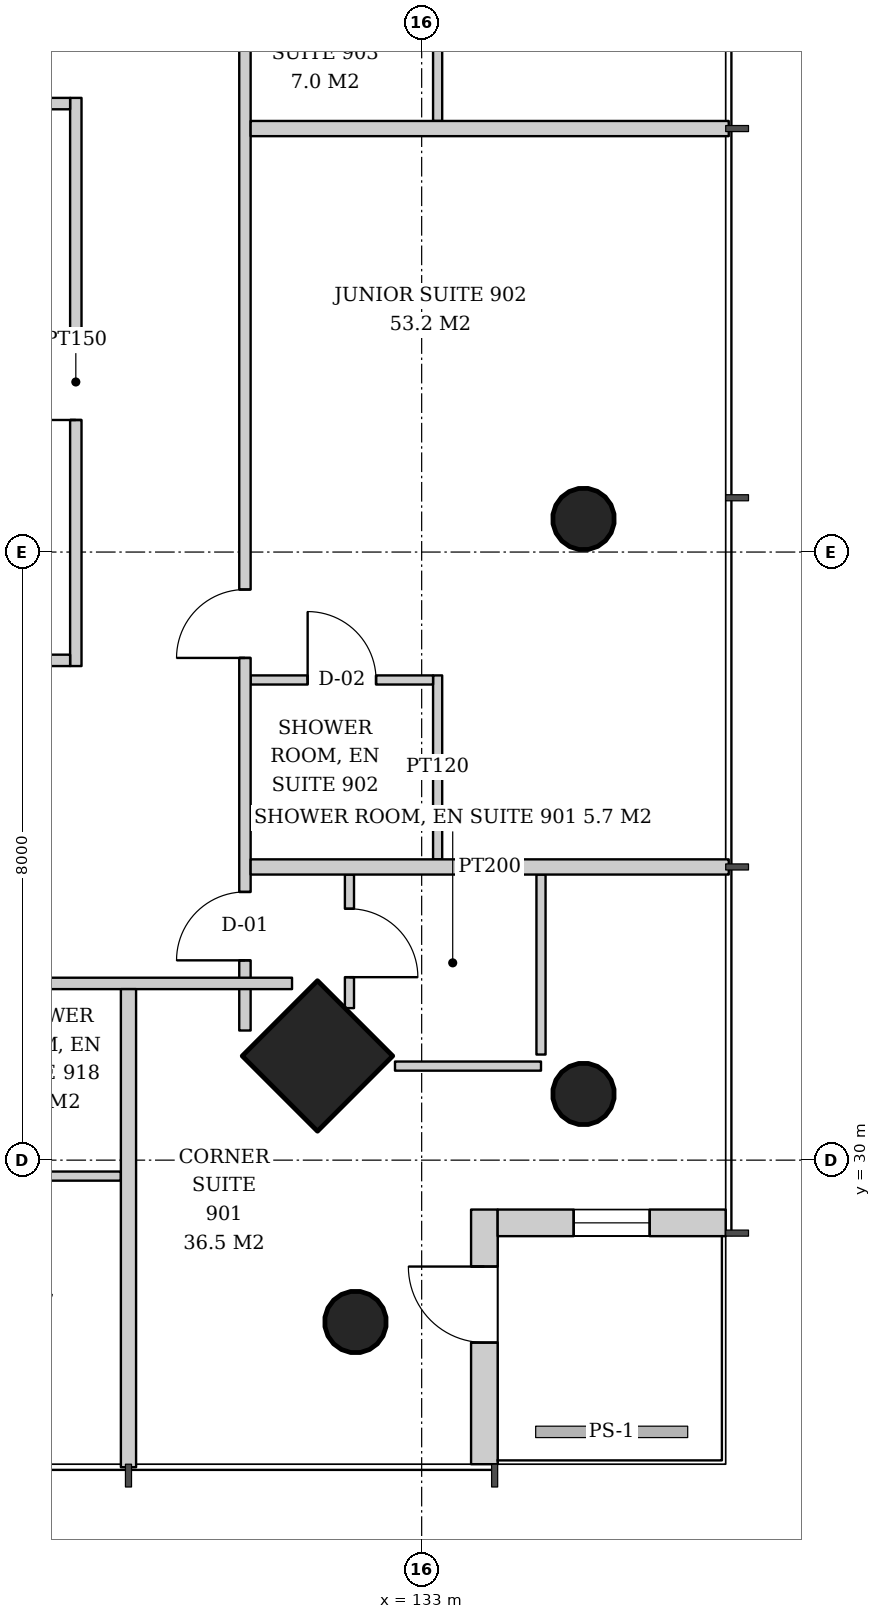
"""IFC4 building model, lengths in metres.
Left out: names, types, materials, properties, quantities, classifications, styles, units other than length and angle.
Written with IfcOpenShell. Run it as: python <this file> out.ifc"""

import sys

from ifc_helpers import new_model, si_unit, direction, frame, frame_2d, origin, origin_2d, place, context, subcontext, project, spatial, rectangle, hollow_circle, extrude, element, fill, save


model = new_model("IFC4")
c1 = context("Model", 3, precision=1e-05, world=origin(), true_north=direction((0.0, 1.0)))
c2 = subcontext(c1, "Body", "Model", "MODEL_VIEW")
j1 = project(units=[si_unit("LENGTHUNIT", "METRE"), si_unit("PLANEANGLEUNIT", "RADIAN")], contexts=[c1])
p1 = place(None, origin())
s1 = spatial("IfcSite", under=j1, at=p1, CompositionType="ELEMENT")
p2 = place(p1, origin())
s2 = spatial("IfcBuilding", under=s1, at=p2, CompositionType="ELEMENT")
p3 = place(p2, frame((0.0, 0.0, 40.0)))
s3 = spatial("IfcBuildingStorey", under=s2, at=p3, CompositionType="ELEMENT", Elevation=40.0)
p4 = place(p3, frame((135.181, 30.819, 0.0), z_axis=(-0.043029647111, 0.043029647111, 0.998146732169), x_axis=(-0.707106781187, -0.707106781187, 0.0)))
e1 = element("IfcColumn", 1, at=p4, inside=s3, PredefinedType="COLUMN", context=c2, shape_type="SweptSolid", body=[
    extrude(hollow_circle(Radius=0.406, WallThickness=0.03, at=origin_2d()), origin(), (0.0, 0.0, 1.0), 3.807),
])
p5 = place(p3, frame((135.181, 38.409, 0.0), z_axis=(-0.043059525333, 0.021561848751, 0.998839808957), x_axis=(-0.44774654769, -0.894160516368, 0.0)))
e2 = element("IfcColumn", 2, at=p5, inside=s3, PredefinedType="COLUMN", context=c2, shape_type="SweptSolid", body=[
    extrude(hollow_circle(Radius=0.406, WallThickness=0.03, at=origin_2d()), origin(), (0.0, 0.0, 1.0), 3.804),
])
p6 = place(p3, frame((131.681, 31.319, 0.0), z_axis=(-0.043029647111, 0.043029647111, 0.998146732169), x_axis=(-0.707106781187, -0.707106781187, 0.0)))
e3 = element("IfcColumn", 3, at=p6, inside=s3, PredefinedType="COLUMN", context=c2, shape_type="SweptSolid", body=[
    extrude(rectangle(XDim=1.4, YDim=1.4, at=origin_2d()), origin(), (0.0, 0.0, 1.0), 3.807),
])
p7 = place(p3, frame((132.181, 27.819, 0.0), z_axis=(-0.043029647111, 0.043029647111, 0.998146732169), x_axis=(-0.707106781187, -0.707106781187, 0.0)))
e4 = element("IfcColumn", 4, at=p7, inside=s3, PredefinedType="COLUMN", context=c2, shape_type="SweptSolid", body=[
    extrude(hollow_circle(Radius=0.406, WallThickness=0.03, at=origin_2d()), origin(), (0.0, 0.0, 1.0), 3.807),
])
p8 = place(p3, frame((133.825, 26.0, 0.0), z_axis=(0.0, 0.0, 1.0), x_axis=(0.0, 1.0, 0.0)))
e5 = element("IfcWall", 5, at=p8, inside=s3, PredefinedType="SOLIDWALL", context=c2, shape_type="SweptSolid", body=[
    extrude(rectangle(XDim=3.35, YDim=0.35, at=frame_2d((1.675, 0.0))), origin(), (0.0, 0.0, 1.0), 3.6),
])
p9 = place(p8, frame((1.6, 0.0, 0.0)))
e6 = element("IfcOpeningElement", 6, at=p9, cuts=e5, PredefinedType="OPENING", context=c2, shape_type="SweptSolid", body=[
    extrude(rectangle(XDim=1.0, YDim=2.4, at=frame_2d((0.5, 1.2))), frame((0.0, 0.185, 0.0), z_axis=(0.0, -1.0, 0.0), x_axis=(1.0, 0.0, 0.0)), (0.0, 0.0, 1.0), 0.37),
])
p10 = place(p3, frame((134.0, 29.175, 0.0), z_axis=(0.0, 0.0, 1.0), x_axis=(1.0, 0.0, 0.0)))
e7 = element("IfcWall", 7, at=p10, inside=s3, PredefinedType="SOLIDWALL", context=c2, shape_type="SweptSolid", body=[
    extrude(rectangle(XDim=3.0, YDim=0.35, at=frame_2d((1.5, 0.0))), origin(), (0.0, 0.0, 1.0), 3.6),
])
p11 = place(p10, frame((1.0, 0.0, 0.9)))
e8 = element("IfcOpeningElement", 8, at=p11, cuts=e7, PredefinedType="OPENING", context=c2, shape_type="SweptSolid", body=[
    extrude(rectangle(XDim=1.0, YDim=2.4, at=frame_2d((0.5, 1.2))), frame((0.0, 0.185, 0.0), z_axis=(0.0, -1.0, 0.0), x_axis=(1.0, 0.0, 0.0)), (0.0, 0.0, 1.0), 0.37),
])
p12 = place(p3, frame((128.45, 36.5, 0.0), z_axis=(0.0, 0.0, 1.0), x_axis=(0.0, 1.0, 0.0)))
e9 = element("IfcWall", 9, at=p12, inside=s3, PredefinedType="PARTITIONING", context=c2, shape_type="SweptSolid", body=[
    extrude(rectangle(XDim=7.475, YDim=0.15, at=frame_2d((3.738, 0.0))), origin(), (0.0, 0.0, 1.0), 2.8),
])
p13 = place(p12, frame((3.238, 0.0, 0.0)))
e10 = element("IfcOpeningElement", 10, at=p13, cuts=e9, PredefinedType="OPENING", context=c2, shape_type="SweptSolid", body=[
    extrude(rectangle(XDim=1.0, YDim=2.1, at=frame_2d((0.5, 1.05))), frame((0.0, 0.085, 0.0), z_axis=(0.0, -1.0, 0.0), x_axis=(1.0, 0.0, 0.0)), (0.0, 0.0, 1.0), 0.17),
])
p14 = place(p3, frame((126.5, 36.575, 0.0), z_axis=(0.0, 0.0, 1.0), x_axis=(1.0, 0.0, 0.0)))
e11 = element("IfcWall", 11, at=p14, inside=s3, PredefinedType="PARTITIONING", context=c2, shape_type="SweptSolid", body=[
    extrude(rectangle(XDim=1.875, YDim=0.15, at=frame_2d((0.938, 0.0))), origin(), (0.0, 0.0, 1.0), 2.8),
])
p15 = place(p3, frame((126.5, 43.9, 0.0), z_axis=(0.0, 0.0, 1.0), x_axis=(1.0, 0.0, 0.0)))
e12 = element("IfcWall", 12, at=p15, inside=s3, PredefinedType="PARTITIONING", context=c2, shape_type="SweptSolid", body=[
    extrude(rectangle(XDim=1.875, YDim=0.15, at=frame_2d((0.938, 0.0))), origin(), (0.0, 0.0, 1.0), 3.6),
])
p16 = place(p3, frame((132.05, 33.757, 0.0), z_axis=(0.0, 0.0, 1.0), x_axis=(0.0, -1.0, 0.0)))
e13 = element("IfcWall", 13, at=p16, inside=s3, PredefinedType="PARTITIONING", context=c2, shape_type="SweptSolid", body=[
    extrude(rectangle(XDim=1.757, YDim=0.12, at=frame_2d((0.878, 0.0))), origin(), (0.0, 0.0, 1.0), 3.6),
])
p17 = place(p16, frame((0.45, 0.0, 0.0)))
e14 = element("IfcOpeningElement", 14, at=p17, cuts=e13, PredefinedType="OPENING", context=c2, shape_type="SweptSolid", body=[
    extrude(rectangle(XDim=0.9, YDim=2.1, at=frame_2d((0.45, 1.05))), frame((0.0, 0.07, 0.0), z_axis=(0.0, -1.0, 0.0), x_axis=(1.0, 0.0, 0.0)), (0.0, 0.0, 1.0), 0.14),
])
p18 = place(p3, frame((134.57, 33.757, 0.0), z_axis=(0.0, 0.0, 1.0), x_axis=(0.0, -1.0, 0.0)))
e15 = element("IfcWall", 15, at=p18, inside=s3, PredefinedType="PARTITIONING", context=c2, shape_type="SweptSolid", body=[
    extrude(rectangle(XDim=2.368, YDim=0.12, at=frame_2d((1.184, 0.0))), origin(), (0.0, 0.0, 1.0), 3.6),
])
p19 = place(p3, frame((132.649, 31.237, 0.0), z_axis=(0.0, 0.0, 1.0), x_axis=(1.0, 0.0, 0.0)))
e16 = element("IfcWall", 16, at=p19, inside=s3, PredefinedType="PARTITIONING", context=c2, shape_type="SweptSolid", body=[
    extrude(rectangle(XDim=1.921, YDim=0.12, at=frame_2d((0.96, 0.0))), origin(), (0.0, 0.0, 1.0), 3.2),
])
p20 = place(p3, frame((133.21, 33.957, 0.0), z_axis=(0.0, 0.0, 1.0), x_axis=(0.0, 1.0, 0.0)))
e17 = element("IfcWall", 17, at=p20, inside=s3, PredefinedType="PARTITIONING", context=c2, shape_type="SweptSolid", body=[
    extrude(rectangle(XDim=2.42, YDim=0.12, at=frame_2d((1.21, 0.0))), origin(), (0.0, 0.0, 1.0), 3.6),
])
p21 = place(p3, frame((130.75, 36.317, 0.0), z_axis=(0.0, 0.0, 1.0), x_axis=(1.0, 0.0, 0.0)))
e18 = element("IfcWall", 18, at=p21, inside=s3, PredefinedType="PARTITIONING", context=c2, shape_type="SweptSolid", body=[
    extrude(rectangle(XDim=2.4, YDim=0.12, at=frame_2d((1.2, 0.0))), origin(), (0.0, 0.0, 1.0), 3.6),
])
p22 = place(p21, frame((0.75, 0.0, 0.0)))
e19 = element("IfcOpeningElement", 19, at=p22, cuts=e18, PredefinedType="OPENING", context=c2, shape_type="SweptSolid", body=[
    extrude(rectangle(XDim=0.9, YDim=2.1, at=frame_2d((0.45, 1.05))), frame((0.0, 0.07, 0.0), z_axis=(0.0, -1.0, 0.0), x_axis=(1.0, 0.0, 0.0)), (0.0, 0.0, 1.0), 0.14),
])
p23 = place(p3, frame((133.21, 43.671, 0.0), z_axis=(0.0, 0.0, 1.0), x_axis=(0.0, 1.0, 0.0)))
e20 = element("IfcWall", 20, at=p23, inside=s3, PredefinedType="PARTITIONING", context=c2, shape_type="SweptSolid", body=[
    extrude(rectangle(XDim=2.72, YDim=0.12, at=frame_2d((1.36, 0.0))), origin(), (0.0, 0.0, 1.0), 2.847),
])
p24 = place(p3, frame((130.675, 31.706, 0.0), z_axis=(0.0, 0.0, 1.0), x_axis=(0.0, 1.0, 0.0)))
e21 = element("IfcWall", 21, at=p24, inside=s3, PredefinedType="PARTITIONING", context=c2, shape_type="SweptSolid", body=[
    extrude(rectangle(XDim=28.589, YDim=0.15, at=frame_2d((14.294, 0.0))), origin(), (0.0, 0.0, 1.0), 2.8),
])
p25 = place(p24, frame((0.923, 0.0, 0.0)))
e22 = element("IfcOpeningElement", 22, at=p25, cuts=e21, PredefinedType="OPENING", context=c2, shape_type="SweptSolid", body=[
    extrude(rectangle(XDim=0.9, YDim=2.1, at=frame_2d((0.45, 1.05))), frame((0.0, 0.085, 0.0), z_axis=(0.0, -1.0, 0.0), x_axis=(1.0, 0.0, 0.0)), (0.0, 0.0, 1.0), 0.17),
])
p26 = place(p24, frame((4.902, 0.0, 0.0)))
e23 = element("IfcOpeningElement", 23, at=p26, cuts=e21, PredefinedType="OPENING", context=c2, shape_type="SweptSolid", body=[
    extrude(rectangle(XDim=0.9, YDim=2.1, at=frame_2d((0.45, 1.05))), frame((0.0, 0.085, 0.0), z_axis=(0.0, -1.0, 0.0), x_axis=(1.0, 0.0, 0.0)), (0.0, 0.0, 1.0), 0.17),
])
p27 = place(p24, frame((14.866, 0.0, 0.0)))
e24 = element("IfcOpeningElement", 24, at=p27, cuts=e21, PredefinedType="OPENING", context=c2, shape_type="SweptSolid", body=[
    extrude(rectangle(XDim=0.9, YDim=2.1, at=frame_2d((0.45, 1.05))), frame((0.0, 0.085, 0.0), z_axis=(0.0, -1.0, 0.0), x_axis=(1.0, 0.0, 0.0)), (0.0, 0.0, 1.0), 0.17),
])
p28 = place(p24, frame((17.93, 0.0, 0.0)))
e25 = element("IfcOpeningElement", 25, at=p28, cuts=e21, PredefinedType="OPENING", context=c2, shape_type="SweptSolid", body=[
    extrude(rectangle(XDim=0.9, YDim=2.1, at=frame_2d((0.45, 1.05))), frame((0.0, 0.085, 0.0), z_axis=(0.0, -1.0, 0.0), x_axis=(1.0, 0.0, 0.0)), (0.0, 0.0, 1.0), 0.17),
])
p29 = place(p24, frame((24.33, 0.0, 0.0)))
e26 = element("IfcOpeningElement", 26, at=p29, cuts=e21, PredefinedType="OPENING", context=c2, shape_type="SweptSolid", body=[
    extrude(rectangle(XDim=0.9, YDim=2.1, at=frame_2d((0.45, 1.05))), frame((0.0, 0.085, 0.0), z_axis=(0.0, -1.0, 0.0), x_axis=(1.0, 0.0, 0.0)), (0.0, 0.0, 1.0), 0.17),
])
for number, where, z_axis, x_axis in (
    (27, (130.75, 33.857, 0.0), (0.0, 0.0, 1.0), (1.0, 0.0, 0.0)),
    (28, (130.75, 43.572, 0.0), (0.0, 0.0, 1.0), (1.0, 0.0, 0.0)),
):
    element("IfcWall", number, at=place(p3, frame(where, z_axis=z_axis, x_axis=x_axis)), inside=s3, PredefinedType="PARTITIONING", context=c2, shape_type="SweptSolid", body=[
        extrude(rectangle(XDim=6.29, YDim=0.2, at=frame_2d((3.145, 0.0))), origin(), (0.0, 0.0, 1.0), 3.05),
    ])
p30 = place(p3, frame((126.623, 29.79, 0.0), z_axis=(0.0, 0.0, 1.0), x_axis=(1.0, 0.0, 0.0)))
e29 = element("IfcWall", 29, at=p30, inside=s3, PredefinedType="PARTITIONING", context=c2, shape_type="SweptSolid", body=[
    extrude(rectangle(XDim=2.42, YDim=0.12, at=frame_2d((1.21, 0.0))), origin(), (0.0, 0.0, 1.0), 3.6),
])
p31 = place(p3, frame((102.706, 32.325, 0.0), z_axis=(0.0, 0.0, 1.0), x_axis=(1.0, 0.0, 0.0)))
e30 = element("IfcWall", 30, at=p31, inside=s3, PredefinedType="PARTITIONING", context=c2, shape_type="SweptSolid", body=[
    extrude(rectangle(XDim=28.589, YDim=0.15, at=frame_2d((14.294, 0.0))), origin(), (0.0, 0.0, 1.0), 2.8),
])
p32 = place(p31, frame((0.923, 0.0, 0.0)))
e31 = element("IfcOpeningElement", 31, at=p32, cuts=e30, PredefinedType="OPENING", context=c2, shape_type="SweptSolid", body=[
    extrude(rectangle(XDim=0.9, YDim=2.1, at=frame_2d((0.45, 1.05))), frame((0.0, 0.085, 0.0), z_axis=(0.0, -1.0, 0.0), x_axis=(1.0, 0.0, 0.0)), (0.0, 0.0, 1.0), 0.17),
])
p33 = place(p31, frame((3.359, 0.0, 0.0)))
e32 = element("IfcOpeningElement", 32, at=p33, cuts=e30, PredefinedType="OPENING", context=c2, shape_type="SweptSolid", body=[
    extrude(rectangle(XDim=0.9, YDim=2.1, at=frame_2d((0.45, 1.05))), frame((0.0, 0.085, 0.0), z_axis=(0.0, -1.0, 0.0), x_axis=(1.0, 0.0, 0.0)), (0.0, 0.0, 1.0), 0.17),
])
p34 = place(p31, frame((9.759, 0.0, 0.0)))
e33 = element("IfcOpeningElement", 33, at=p34, cuts=e30, PredefinedType="OPENING", context=c2, shape_type="SweptSolid", body=[
    extrude(rectangle(XDim=0.9, YDim=2.1, at=frame_2d((0.45, 1.05))), frame((0.0, 0.085, 0.0), z_axis=(0.0, -1.0, 0.0), x_axis=(1.0, 0.0, 0.0)), (0.0, 0.0, 1.0), 0.17),
])
p35 = place(p31, frame((13.073, 0.0, 0.0)))
e34 = element("IfcOpeningElement", 34, at=p35, cuts=e30, PredefinedType="OPENING", context=c2, shape_type="SweptSolid", body=[
    extrude(rectangle(XDim=0.9, YDim=2.1, at=frame_2d((0.45, 1.05))), frame((0.0, 0.085, 0.0), z_axis=(0.0, -1.0, 0.0), x_axis=(1.0, 0.0, 0.0)), (0.0, 0.0, 1.0), 0.17),
])
p36 = place(p31, frame((19.473, 0.0, 0.0)))
e35 = element("IfcOpeningElement", 35, at=p36, cuts=e30, PredefinedType="OPENING", context=c2, shape_type="SweptSolid", body=[
    extrude(rectangle(XDim=0.9, YDim=2.1, at=frame_2d((0.45, 1.05))), frame((0.0, 0.085, 0.0), z_axis=(0.0, -1.0, 0.0), x_axis=(1.0, 0.0, 0.0)), (0.0, 0.0, 1.0), 0.17),
])
p37 = place(p31, frame((22.787, 0.0, 0.0)))
e36 = element("IfcOpeningElement", 36, at=p37, cuts=e30, PredefinedType="OPENING", context=c2, shape_type="SweptSolid", body=[
    extrude(rectangle(XDim=0.9, YDim=2.1, at=frame_2d((0.45, 1.05))), frame((0.0, 0.085, 0.0), z_axis=(0.0, -1.0, 0.0), x_axis=(1.0, 0.0, 0.0)), (0.0, 0.0, 1.0), 0.17),
])
p38 = place(p3, frame((129.143, 32.25, 0.0), z_axis=(0.0, 0.0, 1.0), x_axis=(0.0, -1.0, 0.0)))
e37 = element("IfcWall", 37, at=p38, inside=s3, PredefinedType="PARTITIONING", context=c2, shape_type="SweptSolid", body=[
    extrude(rectangle(XDim=6.29, YDim=0.2, at=frame_2d((3.145, 0.0))), origin(), (0.0, 0.0, 1.0), 3.05),
])
p39 = place(p9, origin())
e38 = element("IfcDoor", 38, at=p39, inside=s3, OperationType="SINGLE_SWING_RIGHT", PredefinedType="DOOR", context=c2, shape_type="SweptSolid", body=[
    extrude(rectangle(XDim=1.0, YDim=2.4, at=frame_2d((0.5, 1.2))), frame((0.0, 0.025, 0.0), z_axis=(0.0, -1.0, 0.0), x_axis=(1.0, 0.0, 0.0)), (0.0, 0.0, 1.0), 0.05),
])
fill(e6, e38)
p40 = place(p11, origin())
e39 = element("IfcWindow", 39, at=p40, inside=s3, PartitioningType="SINGLE_PANEL", PredefinedType="WINDOW", context=c2, shape_type="SweptSolid", body=[
    extrude(rectangle(XDim=1.0, YDim=2.4, at=frame_2d((0.5, 1.2))), frame((0.0, 0.03, 0.0), z_axis=(0.0, -1.0, 0.0), x_axis=(1.0, 0.0, 0.0)), (0.0, 0.0, 1.0), 0.06),
])
fill(e8, e39)
p41 = place(p13, origin())
e40 = element("IfcDoor", 40, at=p41, inside=s3, OperationType="SINGLE_SWING_LEFT", PredefinedType="DOOR", context=c2, shape_type="SweptSolid", body=[
    extrude(rectangle(XDim=1.0, YDim=2.1, at=frame_2d((0.5, 1.05))), frame((0.0, 0.025, 0.0), z_axis=(0.0, -1.0, 0.0), x_axis=(1.0, 0.0, 0.0)), (0.0, 0.0, 1.0), 0.05),
])
fill(e10, e40)
p42 = place(p17, origin())
e41 = element("IfcDoor", 41, at=p42, inside=s3, OperationType="SINGLE_SWING_RIGHT", PredefinedType="DOOR", context=c2, shape_type="SweptSolid", body=[
    extrude(rectangle(XDim=0.9, YDim=2.1, at=frame_2d((0.45, 1.05))), frame((0.0, 0.025, 0.0), z_axis=(0.0, -1.0, 0.0), x_axis=(1.0, 0.0, 0.0)), (0.0, 0.0, 1.0), 0.05),
])
fill(e14, e41)
p43 = place(p22, origin())
e42 = element("IfcDoor", 42, at=p43, inside=s3, OperationType="SINGLE_SWING_LEFT", PredefinedType="DOOR", context=c2, shape_type="SweptSolid", body=[
    extrude(rectangle(XDim=0.9, YDim=2.1, at=frame_2d((0.45, 1.05))), frame((0.0, 0.025, 0.0), z_axis=(0.0, -1.0, 0.0), x_axis=(1.0, 0.0, 0.0)), (0.0, 0.0, 1.0), 0.05),
])
fill(e19, e42)
p44 = place(p25, origin())
e43 = element("IfcDoor", 43, at=p44, inside=s3, OperationType="SINGLE_SWING_LEFT", PredefinedType="DOOR", context=c2, shape_type="SweptSolid", body=[
    extrude(rectangle(XDim=0.9, YDim=2.1, at=frame_2d((0.45, 1.05))), frame((0.0, 0.025, 0.0), z_axis=(0.0, -1.0, 0.0), x_axis=(1.0, 0.0, 0.0)), (0.0, 0.0, 1.0), 0.05),
])
fill(e22, e43)
p45 = place(p26, origin())
e44 = element("IfcDoor", 44, at=p45, inside=s3, OperationType="SINGLE_SWING_LEFT", PredefinedType="DOOR", context=c2, shape_type="SweptSolid", body=[
    extrude(rectangle(XDim=0.9, YDim=2.1, at=frame_2d((0.45, 1.05))), frame((0.0, 0.025, 0.0), z_axis=(0.0, -1.0, 0.0), x_axis=(1.0, 0.0, 0.0)), (0.0, 0.0, 1.0), 0.05),
])
fill(e23, e44)
save(model, sys.argv[1])
